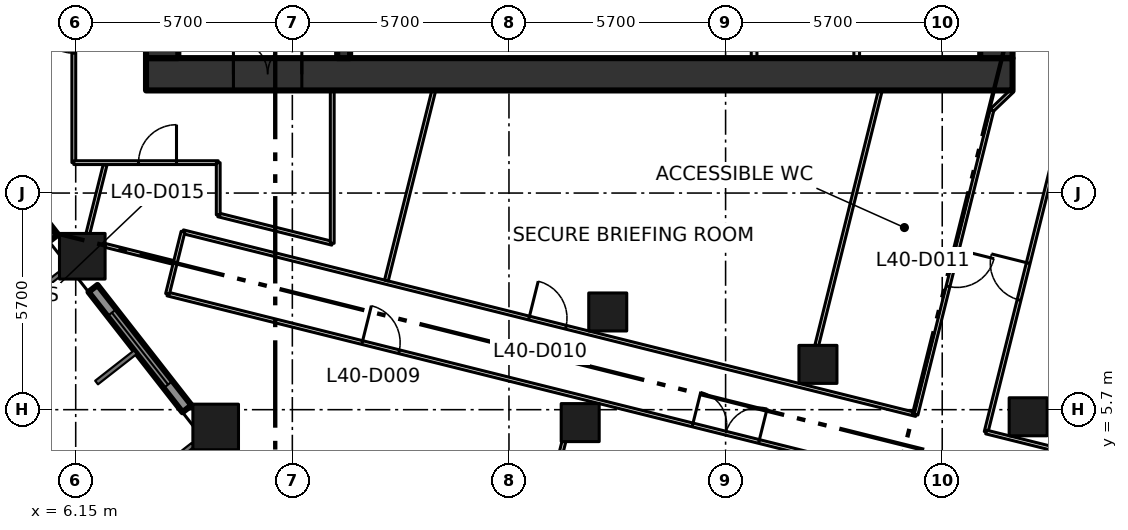
"""IFC4 building model, lengths in metres.
Left out: names, types, materials, properties, quantities, classifications, styles, units other than length and angle.
Written with IfcOpenShell. Run it as: python <this file> out.ifc"""

import sys

from ifc_helpers import new_model, si_unit, direction, frame, frame_2d, origin, origin_2d, place, context, subcontext, project, spatial, rectangle, extrude, element, fill, save


model = new_model("IFC4")
c1 = context("Model", 3, precision=1e-05, world=origin(), true_north=direction((0.0, 1.0)))
c2 = subcontext(c1, "Body", "Model", "MODEL_VIEW")
j1 = project(units=[si_unit("LENGTHUNIT", "METRE"), si_unit("PLANEANGLEUNIT", "RADIAN")], contexts=[c1])
p1 = place(None, origin())
s1 = spatial("IfcSite", under=j1, at=p1, CompositionType="ELEMENT")
p2 = place(p1, origin())
s2 = spatial("IfcBuilding", under=s1, at=p2, CompositionType="ELEMENT")
p3 = place(p2, frame((0.0, 0.0, 178.2)))
s3 = spatial("IfcBuildingStorey", under=s2, at=p3, CompositionType="ELEMENT", Elevation=178.2)
for number, where, z_axis, x_axis in (
    (1, (9.833, 5.245, 0.0), (0.0, 0.0, 1.0), (1.0, 0.0, 0.0)),
    (2, (6.323, 9.737, 0.0), (0.0, 0.0, 1.0), (1.0, 0.0, 0.0)),
):
    element("IfcColumn", number, at=place(p3, frame(where, z_axis=z_axis, x_axis=x_axis)), inside=s3, PredefinedType="COLUMN", context=c2, shape_type="SweptSolid", body=[
        extrude(rectangle(XDim=1.2, YDim=1.2, at=origin_2d()), origin(), (0.0, 0.0, 1.0), 4.2),
    ])
for number, where, z_axis, x_axis in (
    (3, (19.424, 5.36, 0.0), (0.0, 0.0, 1.0), (1.0, 0.0, 0.0)),
    (4, (20.149, 8.271, 0.0), (0.0, 0.0, 1.0), (1.0, 0.0, 0.0)),
    (5, (25.68, 6.892, 0.0), (0.0, 0.0, 1.0), (1.0, 0.0, 0.0)),
    (6, (31.211, 5.513, 0.0), (0.0, 0.0, 1.0), (1.0, 0.0, 0.0)),
):
    element("IfcColumn", number, at=place(p3, frame(where, z_axis=z_axis, x_axis=x_axis)), inside=s3, PredefinedType="COLUMN", context=c2, shape_type="SweptSolid", body=[
        extrude(rectangle(XDim=1.0, YDim=1.0, at=origin_2d()), origin(), (0.0, 0.0, 1.0), 4.2),
    ])
p4 = place(p3, frame((8.0, 14.525, -0.3), z_axis=(0.0, 0.0, 1.0), x_axis=(1.0, 0.0, 0.0)))
e7 = element("IfcWall", 7, at=p4, inside=s3, PredefinedType="SHEAR", context=c2, shape_type="SweptSolid", body=[
    extrude(rectangle(XDim=22.8, YDim=0.85, at=frame_2d((11.4, 0.0))), origin(), (0.0, 0.0, 1.0), 4.2),
])
p5 = place(p4, frame((2.3, 0.0, 0.3)))
e8 = element("IfcOpeningElement", 8, at=p5, cuts=e7, PredefinedType="OPENING", context=c2, shape_type="SweptSolid", body=[
    extrude(rectangle(XDim=1.8, YDim=2.1, at=frame_2d((0.9, 1.05))), frame((0.0, 0.435, 0.0), z_axis=(0.0, -1.0, 0.0), x_axis=(1.0, 0.0, 0.0)), (0.0, 0.0, 1.0), 0.87),
])
for number, where, z_axis, x_axis in (
    (9, (8.425, 14.95, -0.3), (0.0, 0.0, 1.0), (0.0, 1.0, 0.0)),
    (10, (30.375, 14.95, -0.3), (0.0, 0.0, 1.0), (0.0, 1.0, 0.0)),
):
    element("IfcWall", number, at=place(p3, frame(where, z_axis=z_axis, x_axis=x_axis)), inside=s3, PredefinedType="SHEAR", context=c2, shape_type="SweptSolid", body=[
        extrude(rectangle(XDim=20.75, YDim=0.85, at=frame_2d((10.375, 0.0))), origin(), (0.0, 0.0, 1.0), 4.2),
    ])
p6 = place(p3, frame((13.2, 14.95, 0.0), z_axis=(0.0, 0.0, 1.0), x_axis=(0.0, 1.0, 0.0)))
e11 = element("IfcWall", 11, at=p6, inside=s3, PredefinedType="SHEAR", context=c2, shape_type="SweptSolid", body=[
    extrude(rectangle(XDim=20.75, YDim=0.34, at=frame_2d((10.375, 0.0))), origin(), (0.0, 0.0, 1.0), 3.9),
])
p7 = place(p6, frame((3.35, 0.0, 0.0)))
e12 = element("IfcOpeningElement", 12, at=p7, cuts=e11, PredefinedType="OPENING", context=c2, shape_type="SweptSolid", body=[
    extrude(rectangle(XDim=1.8, YDim=2.1, at=frame_2d((0.9, 1.05))), frame((0.0, 0.18, 0.0), z_axis=(0.0, -1.0, 0.0), x_axis=(1.0, 0.0, 0.0)), (0.0, 0.0, 1.0), 0.36),
])
p8 = place(p6, frame((11.45, 0.0, 0.0)))
e13 = element("IfcOpeningElement", 13, at=p8, cuts=e11, PredefinedType="OPENING", context=c2, shape_type="SweptSolid", body=[
    extrude(rectangle(XDim=1.2, YDim=2.1, at=frame_2d((0.6, 1.05))), frame((0.0, 0.18, 0.0), z_axis=(0.0, -1.0, 0.0), x_axis=(1.0, 0.0, 0.0)), (0.0, 0.0, 1.0), 0.36),
])
for number, where, z_axis, x_axis in (
    (14, (24.0, 14.95, 0.0), (0.0, 0.0, 1.0), (0.0, 1.0, 0.0)),
    (15, (26.7, 14.95, 0.0), (0.0, 0.0, 1.0), (0.0, 1.0, 0.0)),
):
    element("IfcWall", number, at=place(p3, frame(where, z_axis=z_axis, x_axis=x_axis)), inside=s3, PredefinedType="PARTITIONING", context=c2, shape_type="SweptSolid", body=[
        extrude(rectangle(XDim=2.675, YDim=0.15, at=frame_2d((1.337, 0.0))), origin(), (0.0, 0.0, 1.0), 3.9),
    ])
p9 = place(p3, frame((3.096, 13.381, 0.0), z_axis=(0.0, 0.0, 1.0), x_axis=(0.615563820493, -0.78808704018, 0.0)))
e16 = element("IfcWall", 16, at=p9, inside=s3, PredefinedType="SOLIDWALL", context=c2, shape_type="SweptSolid", body=[
    extrude(rectangle(XDim=4.016, YDim=0.3, at=frame_2d((2.008, 0.0))), origin(), (0.0, 0.0, 1.0), 3.15),
])
p10 = place(p9, frame((0.808, 0.0, 0.8)))
e17 = element("IfcOpeningElement", 17, at=p10, cuts=e16, PredefinedType="OPENING", context=c2, shape_type="SweptSolid", body=[
    extrude(rectangle(XDim=2.4, YDim=2.1, at=frame_2d((1.2, 1.05))), frame((0.0, 0.16, 0.0), z_axis=(0.0, -1.0, 0.0), x_axis=(1.0, 0.0, 0.0)), (0.0, 0.0, 1.0), 0.32),
])
p11 = place(p3, frame((6.605, 8.889, 0.0), z_axis=(0.0, 0.0, 1.0), x_axis=(0.615706559089, -0.787975528233, 0.0)))
e18 = element("IfcWall", 18, at=p11, inside=s3, PredefinedType="SOLIDWALL", context=c2, shape_type="SweptSolid", body=[
    extrude(rectangle(XDim=4.016, YDim=0.3, at=frame_2d((2.008, 0.0))), origin(), (0.0, 0.0, 1.0), 3.15),
])
p12 = place(p11, frame((0.808, 0.0, 0.8)))
e19 = element("IfcOpeningElement", 19, at=p12, cuts=e18, PredefinedType="OPENING", context=c2, shape_type="SweptSolid", body=[
    extrude(rectangle(XDim=2.4, YDim=2.1, at=frame_2d((1.2, 1.05))), frame((0.0, 0.16, 0.0), z_axis=(0.0, -1.0, 0.0), x_axis=(1.0, 0.0, 0.0)), (0.0, 0.0, 1.0), 0.32),
])
p13 = place(p3, frame((6.1, 12.2, 0.0), z_axis=(0.0, 0.0, 1.0), x_axis=(0.0, 1.0, 0.0)))
e20 = element("IfcWall", 20, at=p13, inside=s3, PredefinedType="PARTITIONING", context=c2, shape_type="SweptSolid", body=[
    extrude(rectangle(XDim=26.7, YDim=0.1, at=frame_2d((13.35, 0.0))), origin(), (0.0, 0.0, 1.0), 3.9),
])
p14 = place(p13, frame((2.88, 0.0, 0.0)))
e21 = element("IfcOpeningElement", 21, at=p14, cuts=e20, PredefinedType="OPENING", context=c2, shape_type="SweptSolid", body=[
    extrude(rectangle(XDim=1.0, YDim=2.1, at=frame_2d((0.5, 1.05))), frame((0.0, 0.06, 0.0), z_axis=(0.0, -1.0, 0.0), x_axis=(1.0, 0.0, 0.0)), (0.0, 0.0, 1.0), 0.12),
])
p15 = place(p13, frame((11.578, 0.0, 0.0)))
e22 = element("IfcOpeningElement", 22, at=p15, cuts=e20, PredefinedType="OPENING", context=c2, shape_type="SweptSolid", body=[
    extrude(rectangle(XDim=1.0, YDim=2.1, at=frame_2d((0.5, 1.05))), frame((0.0, 0.06, 0.0), z_axis=(0.0, -1.0, 0.0), x_axis=(1.0, 0.0, 0.0)), (0.0, 0.0, 1.0), 0.12),
])
p16 = place(p3, frame((6.1, 12.2, 0.0), z_axis=(0.0, 0.0, 1.0), x_axis=(1.0, 0.0, 0.0)))
e23 = element("IfcWall", 23, at=p16, inside=s3, PredefinedType="PARTITIONING", context=c2, shape_type="SweptSolid", body=[
    extrude(rectangle(XDim=3.8, YDim=0.1, at=frame_2d((1.9, 0.0))), origin(), (0.0, 0.0, 1.0), 3.9),
])
p17 = place(p16, frame((1.702, 0.0, 0.0)))
e24 = element("IfcOpeningElement", 24, at=p17, cuts=e23, PredefinedType="OPENING", context=c2, shape_type="SweptSolid", body=[
    extrude(rectangle(XDim=1.0, YDim=2.1, at=frame_2d((0.5, 1.05))), frame((0.0, 0.06, 0.0), z_axis=(0.0, -1.0, 0.0), x_axis=(1.0, 0.0, 0.0)), (0.0, 0.0, 1.0), 0.12),
])
p18 = place(p3, frame((8.565, 8.744, 0.0), z_axis=(0.0, 0.0, 1.0), x_axis=(0.97029693432, -0.24191705035, 0.0)))
e25 = element("IfcWall", 25, at=p18, inside=s3, PredefinedType="PARTITIONING", context=c2, shape_type="SweptSolid", body=[
    extrude(rectangle(XDim=56.375, YDim=0.1, at=frame_2d((28.187, 0.0))), origin(), (0.0, 0.0, 1.0), 3.9),
])
p19 = place(p18, frame((42.739, 0.0, 0.0)))
e26 = element("IfcOpeningElement", 26, at=p19, cuts=e25, PredefinedType="OPENING", context=c2, shape_type="SweptSolid", body=[
    extrude(rectangle(XDim=1.8, YDim=2.1, at=frame_2d((0.9, 1.05))), frame((0.0, 0.06, 0.0), z_axis=(0.0, -1.0, 0.0), x_axis=(1.0, 0.0, 0.0)), (0.0, 0.0, 1.0), 0.12),
])
p20 = place(p18, frame((14.239, 0.0, 0.0)))
e27 = element("IfcOpeningElement", 27, at=p20, cuts=e25, PredefinedType="OPENING", context=c2, shape_type="SweptSolid", body=[
    extrude(rectangle(XDim=1.8, YDim=2.1, at=frame_2d((0.9, 1.05))), frame((0.0, 0.06, 0.0), z_axis=(0.0, -1.0, 0.0), x_axis=(1.0, 0.0, 0.0)), (0.0, 0.0, 1.0), 0.12),
])
p21 = place(p18, frame((29.74, 0.0, 0.0)))
e28 = element("IfcOpeningElement", 28, at=p21, cuts=e25, PredefinedType="OPENING", context=c2, shape_type="SweptSolid", body=[
    extrude(rectangle(XDim=1.8, YDim=2.1, at=frame_2d((0.9, 1.05))), frame((0.0, 0.06, 0.0), z_axis=(0.0, -1.0, 0.0), x_axis=(1.0, 0.0, 0.0)), (0.0, 0.0, 1.0), 0.12),
])
p22 = place(p18, frame((35.64, 0.0, 0.0)))
e29 = element("IfcOpeningElement", 29, at=p22, cuts=e25, PredefinedType="OPENING", context=c2, shape_type="SweptSolid", body=[
    extrude(rectangle(XDim=1.0, YDim=2.1, at=frame_2d((0.5, 1.05))), frame((0.0, 0.06, 0.0), z_axis=(0.0, -1.0, 0.0), x_axis=(1.0, 0.0, 0.0)), (0.0, 0.0, 1.0), 0.12),
])
p23 = place(p18, frame((5.28, 0.0, 0.0)))
e30 = element("IfcOpeningElement", 30, at=p23, cuts=e25, PredefinedType="OPENING", context=c2, shape_type="SweptSolid", body=[
    extrude(rectangle(XDim=1.0, YDim=2.1, at=frame_2d((0.5, 1.05))), frame((0.0, 0.06, 0.0), z_axis=(0.0, -1.0, 0.0), x_axis=(1.0, 0.0, 0.0)), (0.0, 0.0, 1.0), 0.12),
])
p24 = place(p3, frame((8.973, 10.382, 0.0), z_axis=(0.0, 0.0, 1.0), x_axis=(0.970286808807, -0.241957658808, 0.0)))
e31 = element("IfcWall", 31, at=p24, inside=s3, PredefinedType="PARTITIONING", context=c2, shape_type="SweptSolid", body=[
    extrude(rectangle(XDim=19.88, YDim=0.1, at=frame_2d((9.94, 0.0))), origin(), (0.0, 0.0, 1.0), 3.9),
])
p25 = place(p24, frame((9.384, 0.0, 0.0)))
e32 = element("IfcOpeningElement", 32, at=p25, cuts=e31, PredefinedType="OPENING", context=c2, shape_type="SweptSolid", body=[
    extrude(rectangle(XDim=1.0, YDim=2.1, at=frame_2d((0.5, 1.05))), frame((0.0, 0.06, 0.0), z_axis=(0.0, -1.0, 0.0), x_axis=(1.0, 0.0, 0.0)), (0.0, 0.0, 1.0), 0.12),
])
p26 = place(p3, frame((8.973, 10.382, 0.0), z_axis=(0.0, 0.0, 1.0), x_axis=(-0.241650823739, -0.970363271866, 0.0)))
e33 = element("IfcWall", 33, at=p26, inside=s3, PredefinedType="PARTITIONING", context=c2, shape_type="SweptSolid", body=[
    extrude(rectangle(XDim=1.688, YDim=0.1, at=frame_2d((0.844, 0.0))), origin(), (0.0, 0.0, 1.0), 3.9),
])
p27 = place(p3, frame((9.9, 10.826, 0.0), z_axis=(0.0, 0.0, 1.0), x_axis=(0.970290953223, -0.241941038466, 0.0)))
e34 = element("IfcWall", 34, at=p27, inside=s3, PredefinedType="PARTITIONING", context=c2, shape_type="SweptSolid", body=[
    extrude(rectangle(XDim=3.092, YDim=0.1, at=frame_2d((1.546, 0.0))), origin(), (0.0, 0.0, 1.0), 3.9),
])
p28 = place(p3, frame((9.9, 12.2, 0.0), z_axis=(0.0, 0.0, 1.0), x_axis=(0.0, -1.0, 0.0)))
e35 = element("IfcWall", 35, at=p28, inside=s3, PredefinedType="PARTITIONING", context=c2, shape_type="SweptSolid", body=[
    extrude(rectangle(XDim=1.374, YDim=0.1, at=frame_2d((0.687, 0.0))), origin(), (0.0, 0.0, 1.0), 3.9),
])
p29 = place(p3, frame((12.9, 10.078, 0.0), z_axis=(0.0, 0.0, 1.0), x_axis=(0.0, 1.0, 0.0)))
e36 = element("IfcWall", 36, at=p29, inside=s3, PredefinedType="PARTITIONING", context=c2, shape_type="SweptSolid", body=[
    extrude(rectangle(XDim=4.022, YDim=0.1, at=frame_2d((2.011, 0.0))), origin(), (0.0, 0.0, 1.0), 3.9),
])
p30 = place(p3, frame((30.105, 5.113, 0.0), z_axis=(0.0, 0.0, 1.0), x_axis=(0.241984285369, 0.970280168629, 0.0)))
e37 = element("IfcWall", 37, at=p30, inside=s3, PredefinedType="PARTITIONING", context=c2, shape_type="SweptSolid", body=[
    extrude(rectangle(XDim=8.232, YDim=0.1, at=frame_2d((4.116, 0.0))), origin(), (0.0, 0.0, 1.0), 3.9),
])
p31 = place(p30, frame((3.58, 0.0, 0.0)))
e38 = element("IfcOpeningElement", 38, at=p31, cuts=e37, PredefinedType="OPENING", context=c2, shape_type="SweptSolid", body=[
    extrude(rectangle(XDim=1.0, YDim=2.1, at=frame_2d((0.5, 1.05))), frame((0.0, 0.06, 0.0), z_axis=(0.0, -1.0, 0.0), x_axis=(1.0, 0.0, 0.0)), (0.0, 0.0, 1.0), 0.12),
])
p32 = place(p3, frame((30.259, 13.583, 0.0), z_axis=(0.0, 0.0, 1.0), x_axis=(-0.241888494143, -0.970304053584, 0.0)))
e39 = element("IfcWall", 39, at=p32, inside=s3, PredefinedType="PARTITIONING", context=c2, shape_type="SweptSolid", body=[
    extrude(rectangle(XDim=8.256, YDim=0.1, at=frame_2d((4.128, 0.0))), origin(), (0.0, 0.0, 1.0), 3.9),
])
p33 = place(p32, frame((3.78, 0.0, 0.0)))
e40 = element("IfcOpeningElement", 40, at=p33, cuts=e39, PredefinedType="OPENING", context=c2, shape_type="SweptSolid", body=[
    extrude(rectangle(XDim=1.0, YDim=2.1, at=frame_2d((0.5, 1.05))), frame((0.0, 0.06, 0.0), z_axis=(0.0, -1.0, 0.0), x_axis=(1.0, 0.0, 0.0)), (0.0, 0.0, 1.0), 0.12),
])
p34 = place(p3, frame((30.8, 14.1, 0.0), z_axis=(0.0, 0.0, 1.0), x_axis=(-0.722911025189, -0.690941133281, 0.0)))
e41 = element("IfcWall", 41, at=p34, inside=s3, PredefinedType="PARTITIONING", context=c2, shape_type="SweptSolid", body=[
    extrude(rectangle(XDim=0.748, YDim=0.1, at=frame_2d((0.374, 0.0))), origin(), (0.0, 0.0, 1.0), 3.9),
])
p35 = place(p3, frame((49.536, 0.268, 0.0), z_axis=(0.0, 0.0, 1.0), x_axis=(-0.970292195994, 0.241936054348, 0.0)))
e42 = element("IfcWall", 42, at=p35, inside=s3, PredefinedType="PARTITIONING", context=c2, shape_type="SweptSolid", body=[
    extrude(rectangle(XDim=20.026, YDim=0.1, at=frame_2d((10.013, 0.0))), origin(), (0.0, 0.0, 1.0), 3.9),
])
p36 = place(p35, frame((9.18, 0.0, 0.0)))
e43 = element("IfcOpeningElement", 43, at=p36, cuts=e42, PredefinedType="OPENING", context=c2, shape_type="SweptSolid", body=[
    extrude(rectangle(XDim=1.8, YDim=2.1, at=frame_2d((0.9, 1.05))), frame((0.0, 0.06, 0.0), z_axis=(0.0, -1.0, 0.0), x_axis=(1.0, 0.0, 0.0)), (0.0, 0.0, 1.0), 0.12),
])
p37 = place(p3, frame((6.922, 12.138, 0.0), z_axis=(0.0, 0.0, 1.0), x_axis=(-0.242504681353, -0.970150235542, 0.0)))
e44 = element("IfcWall", 44, at=p37, inside=s3, PredefinedType="PARTITIONING", context=c2, shape_type="SweptSolid", body=[
    extrude(rectangle(XDim=1.856, YDim=0.1, at=frame_2d((0.928, 0.0))), origin(), (0.0, 0.0, 1.0), 3.9),
])
p38 = place(p3, frame((8.72, 9.574, 0.0), z_axis=(0.0, 0.0, 1.0), x_axis=(-0.97017350799, 0.242411559945, 0.0)))
e45 = element("IfcWall", 45, at=p38, inside=s3, PredefinedType="PARTITIONING", context=c2, shape_type="SweptSolid", body=[
    extrude(rectangle(XDim=1.852, YDim=0.1, at=frame_2d((0.926, 0.0))), origin(), (0.0, 0.0, 1.0), 3.9),
])
p39 = place(p3, frame((14.325, 9.099, 0.0), z_axis=(0.0, 0.0, 1.0), x_axis=(0.241956019685, 0.970287217548, 0.0)))
e46 = element("IfcWall", 46, at=p39, inside=s3, PredefinedType="PARTITIONING", context=c2, shape_type="SweptSolid", body=[
    extrude(rectangle(XDim=5.154, YDim=0.1, at=frame_2d((2.577, 0.0))), origin(), (0.0, 0.0, 1.0), 3.9),
])
p40 = place(p3, frame((17.001, -3.138, 0.0), z_axis=(0.0, 0.0, 1.0), x_axis=(0.241922303467, 0.970295624583, 0.0)))
e47 = element("IfcWall", 47, at=p40, inside=s3, PredefinedType="PARTITIONING", context=c2, shape_type="SweptSolid", body=[
    extrude(rectangle(XDim=8.243, YDim=0.1, at=frame_2d((4.122, 0.0))), origin(), (0.0, 0.0, 1.0), 3.9),
])
p41 = place(p3, frame((25.649, 7.392, 0.0), z_axis=(0.0, 0.0, 1.0), x_axis=(0.241870819599, 0.970308459525, 0.0)))
e48 = element("IfcWall", 48, at=p41, inside=s3, PredefinedType="PARTITIONING", context=c2, shape_type="SweptSolid", body=[
    extrude(rectangle(XDim=6.913, YDim=0.1, at=frame_2d((3.457, 0.0))), origin(), (0.0, 0.0, 1.0), 3.9),
])
p42 = place(p5, origin())
e49 = element("IfcDoor", 49, at=p42, inside=s3, OperationType="DOUBLE_DOOR_SINGLE_SWING", PredefinedType="DOOR", context=c2, shape_type="SweptSolid", body=[
    extrude(rectangle(XDim=1.8, YDim=2.1, at=frame_2d((0.9, 1.05))), frame((0.0, 0.025, 0.0), z_axis=(0.0, -1.0, 0.0), x_axis=(1.0, 0.0, 0.0)), (0.0, 0.0, 1.0), 0.05),
])
fill(e8, e49)
p43 = place(p12, origin())
e50 = element("IfcWindow", 50, at=p43, inside=s3, PartitioningType="DOUBLE_PANEL_VERTICAL", PredefinedType="WINDOW", context=c2, shape_type="SweptSolid", body=[
    extrude(rectangle(XDim=2.4, YDim=2.1, at=frame_2d((1.2, 1.05))), frame((0.0, 0.03, 0.0), z_axis=(0.0, -1.0, 0.0), x_axis=(1.0, 0.0, 0.0)), (0.0, 0.0, 1.0), 0.06),
])
fill(e19, e50)
p44 = place(p20, origin())
e51 = element("IfcDoor", 51, at=p44, inside=s3, OperationType="DOUBLE_DOOR_SINGLE_SWING", PredefinedType="DOOR", context=c2, shape_type="SweptSolid", body=[
    extrude(rectangle(XDim=1.8, YDim=2.1, at=frame_2d((0.9, 1.05))), frame((0.0, 0.025, 0.0), z_axis=(0.0, -1.0, 0.0), x_axis=(1.0, 0.0, 0.0)), (0.0, 0.0, 1.0), 0.05),
])
fill(e27, e51)
p45 = place(p23, origin())
e52 = element("IfcDoor", 52, at=p45, inside=s3, OperationType="SINGLE_SWING_LEFT", PredefinedType="DOOR", context=c2, shape_type="SweptSolid", body=[
    extrude(rectangle(XDim=1.0, YDim=2.1, at=frame_2d((0.5, 1.05))), frame((0.0, 0.025, 0.0), z_axis=(0.0, -1.0, 0.0), x_axis=(1.0, 0.0, 0.0)), (0.0, 0.0, 1.0), 0.05),
])
fill(e30, e52)
p46 = place(p25, origin())
e53 = element("IfcDoor", 53, at=p46, inside=s3, OperationType="SINGLE_SWING_LEFT", PredefinedType="DOOR", context=c2, shape_type="SweptSolid", body=[
    extrude(rectangle(XDim=1.0, YDim=2.1, at=frame_2d((0.5, 1.05))), frame((0.0, 0.025, 0.0), z_axis=(0.0, -1.0, 0.0), x_axis=(1.0, 0.0, 0.0)), (0.0, 0.0, 1.0), 0.05),
])
fill(e32, e53)
p47 = place(p33, origin())
e54 = element("IfcDoor", 54, at=p47, inside=s3, OperationType="SINGLE_SWING_LEFT", PredefinedType="DOOR", context=c2, shape_type="SweptSolid", body=[
    extrude(rectangle(XDim=1.0, YDim=2.1, at=frame_2d((0.5, 1.05))), frame((0.0, 0.025, 0.0), z_axis=(0.0, -1.0, 0.0), x_axis=(1.0, 0.0, 0.0)), (0.0, 0.0, 1.0), 0.05),
])
fill(e40, e54)
p48 = place(p31, origin())
e55 = element("IfcDoor", 55, at=p48, inside=s3, OperationType="SINGLE_SWING_RIGHT", PredefinedType="DOOR", context=c2, shape_type="SweptSolid", body=[
    extrude(rectangle(XDim=1.0, YDim=2.1, at=frame_2d((0.5, 1.05))), frame((0.0, 0.025, 0.0), z_axis=(0.0, -1.0, 0.0), x_axis=(1.0, 0.0, 0.0)), (0.0, 0.0, 1.0), 0.05),
])
fill(e38, e55)
p49 = place(p14, origin())
e56 = element("IfcDoor", 56, at=p49, inside=s3, OperationType="SINGLE_SWING_RIGHT", PredefinedType="DOOR", context=c2, shape_type="SweptSolid", body=[
    extrude(rectangle(XDim=1.0, YDim=2.1, at=frame_2d((0.5, 1.05))), frame((0.0, 0.025, 0.0), z_axis=(0.0, -1.0, 0.0), x_axis=(1.0, 0.0, 0.0)), (0.0, 0.0, 1.0), 0.05),
])
fill(e21, e56)
p50 = place(p17, origin())
e57 = element("IfcDoor", 57, at=p50, inside=s3, OperationType="SINGLE_SWING_RIGHT", PredefinedType="DOOR", context=c2, shape_type="SweptSolid", body=[
    extrude(rectangle(XDim=1.0, YDim=2.1, at=frame_2d((0.5, 1.05))), frame((0.0, 0.025, 0.0), z_axis=(0.0, -1.0, 0.0), x_axis=(1.0, 0.0, 0.0)), (0.0, 0.0, 1.0), 0.05),
])
fill(e24, e57)
save(model, sys.argv[1])
